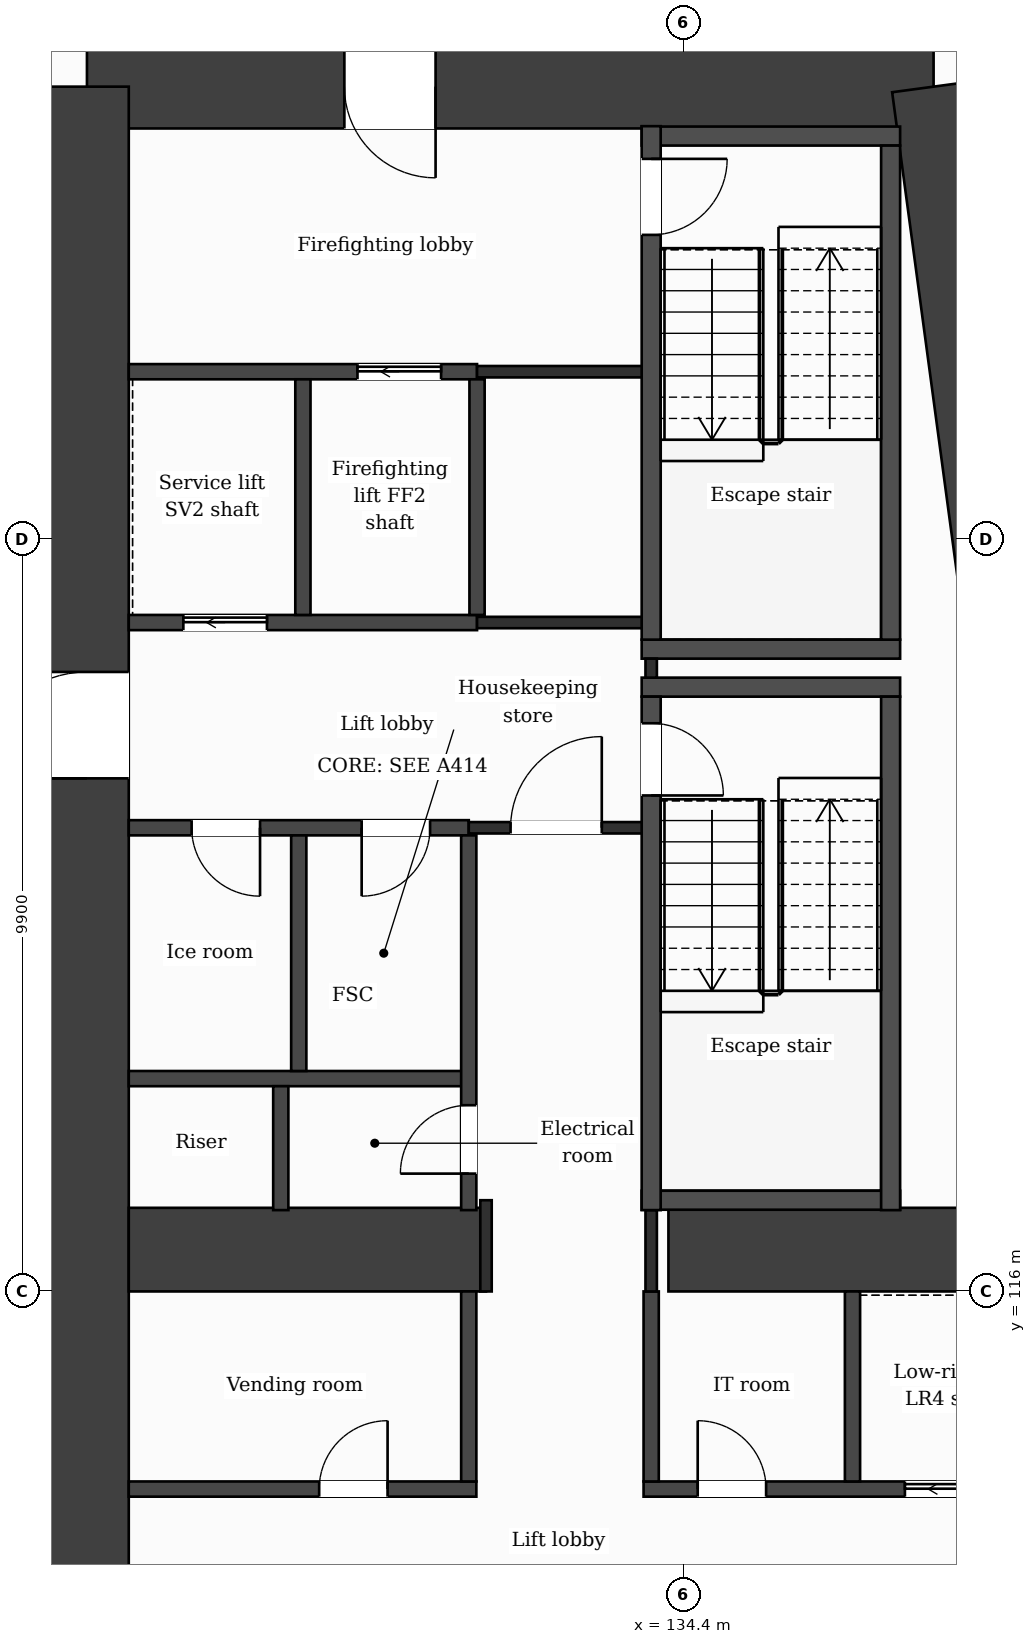
"""IFC4 building model, lengths in metres.
Left out: names, types, materials, properties, quantities, classifications, styles, units other than length and angle.
Written with IfcOpenShell. Run it as: python <this file> out.ifc"""

import sys

from ifc_helpers import new_model, si_unit, direction, frame, frame_2d, origin, place, context, subcontext, project, spatial, rectangle, extrude, element, fill, save


model = new_model("IFC4")
c1 = context("Model", 3, precision=1e-05, world=origin(), true_north=direction((0.0, 1.0)))
c2 = subcontext(c1, "Body", "Model", "MODEL_VIEW")
j1 = project(units=[si_unit("LENGTHUNIT", "METRE"), si_unit("PLANEANGLEUNIT", "RADIAN")], contexts=[c1])
p1 = place(None, origin())
s1 = spatial("IfcSite", under=j1, at=p1, CompositionType="ELEMENT")
p2 = place(p1, origin())
s2 = spatial("IfcBuilding", under=s1, at=p2, CompositionType="ELEMENT")
p3 = place(p2, frame((0.0, 0.0, 63.5)))
s3 = spatial("IfcBuildingStorey", under=s2, at=p3, CompositionType="ELEMENT", Elevation=63.5)
p4 = place(p3, frame((126.55, 131.85, 0.0), z_axis=(0.0, 0.0, 1.0), x_axis=(1.0, 0.0, 0.0)))
e1 = element("IfcWall", 1, at=p4, inside=s3, PredefinedType="SHEAR", context=c2, shape_type="SweptSolid", body=[
    extrude(rectangle(XDim=11.138, YDim=1.1, at=frame_2d((5.569, 0.0))), origin(), (0.0, 0.0, 1.0), 3.5),
])
p5 = place(p4, frame((3.386, 0.0, 0.0)))
e2 = element("IfcOpeningElement", 2, at=p5, cuts=e1, PredefinedType="OPENING", context=c2, shape_type="SweptSolid", body=[
    extrude(rectangle(XDim=1.2, YDim=2.1, at=frame_2d((0.6, 1.05))), frame((0.0, 0.56, 0.0), z_axis=(0.0, -1.0, 0.0), x_axis=(1.0, 0.0, 0.0)), (0.0, 0.0, 1.0), 1.12),
])
p6 = place(p3, frame((137.688, 131.85, 0.0), z_axis=(0.0, 0.0, 1.0), x_axis=(0.133411793472, -0.991060691059, 0.0)))
e3 = element("IfcWall", 3, at=p6, inside=s3, PredefinedType="SHEAR", context=c2, shape_type="SweptSolid", body=[
    extrude(rectangle(XDim=21.089, YDim=1.1, at=frame_2d((10.544, 0.0))), origin(), (0.0, 0.0, 1.0), 3.5),
])
p7 = place(p3, frame((126.55, 110.95, 0.0), z_axis=(0.0, 0.0, 1.0), x_axis=(0.0, 1.0, 0.0)))
e4 = element("IfcWall", 4, at=p7, inside=s3, PredefinedType="SHEAR", context=c2, shape_type="SweptSolid", body=[
    extrude(rectangle(XDim=20.9, YDim=1.1, at=frame_2d((10.45, 0.0))), origin(), (0.0, 0.0, 1.0), 3.5),
])
p8 = place(p7, frame((11.8, 0.0, 0.0)))
e5 = element("IfcOpeningElement", 5, at=p8, cuts=e4, PredefinedType="OPENING", context=c2, shape_type="SweptSolid", body=[
    extrude(rectangle(XDim=1.4, YDim=2.1, at=frame_2d((0.7, 1.05))), frame((0.0, 0.56, 0.0), z_axis=(0.0, -1.0, 0.0), x_axis=(1.0, 0.0, 0.0)), (0.0, 0.0, 1.0), 1.12),
])
p9 = place(p3, frame((127.1, 116.55, 0.0), z_axis=(0.0, 0.0, 1.0), x_axis=(1.0, 0.0, 0.0)))
e6 = element("IfcWall", 6, at=p9, inside=s3, PredefinedType="SHEAR", context=c2, shape_type="SweptSolid", body=[
    extrude(rectangle(XDim=4.7, YDim=1.1, at=frame_2d((2.35, 0.0))), origin(), (0.0, 0.0, 1.0), 3.5),
])
p10 = place(p3, frame((134.2, 116.55, 0.0), z_axis=(0.0, 0.0, 1.0), x_axis=(1.0, 0.0, 0.0)))
e7 = element("IfcWall", 7, at=p10, inside=s3, PredefinedType="SHEAR", context=c2, shape_type="SweptSolid", body=[
    extrude(rectangle(XDim=5.077, YDim=1.1, at=frame_2d((2.539, 0.0))), origin(), (0.0, 0.0, 1.0), 3.5),
])
p11 = place(p3, frame((127.1, 113.4, 0.0), z_axis=(0.0, 0.0, 1.0), x_axis=(1.0, 0.0, 0.0)))
e8 = element("IfcWall", 8, at=p11, inside=s3, PredefinedType="PARTITIONING", context=c2, shape_type="SweptSolid", body=[
    extrude(rectangle(XDim=4.573, YDim=0.2, at=frame_2d((2.287, 0.0))), origin(), (0.0, 0.0, 1.0), 3.18),
])
p12 = place(p11, frame((2.505, 0.0, 0.0)))
e9 = element("IfcOpeningElement", 9, at=p12, cuts=e8, PredefinedType="OPENING", context=c2, shape_type="SweptSolid", body=[
    extrude(rectangle(XDim=0.9, YDim=2.1, at=frame_2d((0.45, 1.05))), frame((0.0, 0.11, 0.0), z_axis=(0.0, -1.0, 0.0), x_axis=(1.0, 0.0, 0.0)), (0.0, 0.0, 1.0), 0.22),
])
p13 = place(p3, frame((133.873, 113.4, 0.0), z_axis=(0.0, 0.0, 1.0), x_axis=(1.0, 0.0, 0.0)))
e10 = element("IfcWall", 10, at=p13, inside=s3, PredefinedType="PARTITIONING", context=c2, shape_type="SweptSolid", body=[
    extrude(rectangle(XDim=5.774, YDim=0.2, at=frame_2d((2.887, 0.0))), origin(), (0.0, 0.0, 1.0), 3.18),
])
p14 = place(p13, frame((3.438, 0.0, 0.0)))
e11 = element("IfcOpeningElement", 11, at=p14, cuts=e10, PredefinedType="OPENING", context=c2, shape_type="SweptSolid", body=[
    extrude(rectangle(XDim=1.1, YDim=2.1, at=frame_2d((0.55, 1.05))), frame((0.0, 0.11, 0.0), z_axis=(0.0, -1.0, 0.0), x_axis=(1.0, 0.0, 0.0)), (0.0, 0.0, 1.0), 0.22),
])
p15 = place(p13, frame((0.712, 0.0, 0.0)))
e12 = element("IfcOpeningElement", 12, at=p15, cuts=e10, PredefinedType="OPENING", context=c2, shape_type="SweptSolid", body=[
    extrude(rectangle(XDim=0.9, YDim=2.1, at=frame_2d((0.45, 1.05))), frame((0.0, 0.11, 0.0), z_axis=(0.0, -1.0, 0.0), x_axis=(1.0, 0.0, 0.0)), (0.0, 0.0, 1.0), 0.22),
])
p16 = place(p3, frame((133.848, 117.2, 0.0), z_axis=(0.0, 0.0, 1.0), x_axis=(1.0, 0.0, 0.0)))
e13 = element("IfcWall", 13, at=p16, inside=s3, PredefinedType="PARTITIONING", context=c2, shape_type="SweptSolid", body=[
    extrude(rectangle(XDim=3.4, YDim=0.25, at=frame_2d((1.7, 0.0))), origin(), (0.0, 0.0, 1.0), 3.18),
])
p17 = place(p3, frame((127.1, 118.8, 0.0), z_axis=(0.0, 0.0, 1.0), x_axis=(1.0, 0.0, 0.0)))
e14 = element("IfcWall", 14, at=p17, inside=s3, PredefinedType="PARTITIONING", context=c2, shape_type="SweptSolid", body=[
    extrude(rectangle(XDim=4.473, YDim=0.2, at=frame_2d((2.236, 0.0))), origin(), (0.0, 0.0, 1.0), 3.18),
])
p18 = place(p3, frame((127.1, 122.1, 0.0), z_axis=(0.0, 0.0, 1.0), x_axis=(1.0, 0.0, 0.0)))
e15 = element("IfcWall", 15, at=p18, inside=s3, PredefinedType="PARTITIONING", context=c2, shape_type="SweptSolid", body=[
    extrude(rectangle(XDim=4.473, YDim=0.2, at=frame_2d((2.236, 0.0))), origin(), (0.0, 0.0, 1.0), 3.18),
])
p19 = place(p18, frame((3.064, 0.0, 0.0)))
e16 = element("IfcOpeningElement", 16, at=p19, cuts=e15, PredefinedType="OPENING", context=c2, shape_type="SweptSolid", body=[
    extrude(rectangle(XDim=0.9, YDim=2.1, at=frame_2d((0.45, 1.05))), frame((0.0, 0.11, 0.0), z_axis=(0.0, -1.0, 0.0), x_axis=(1.0, 0.0, 0.0)), (0.0, 0.0, 1.0), 0.22),
])
p20 = place(p18, frame((0.827, 0.0, 0.0)))
e17 = element("IfcOpeningElement", 17, at=p20, cuts=e15, PredefinedType="OPENING", context=c2, shape_type="SweptSolid", body=[
    extrude(rectangle(XDim=0.9, YDim=2.1, at=frame_2d((0.45, 1.05))), frame((0.0, 0.11, 0.0), z_axis=(0.0, -1.0, 0.0), x_axis=(1.0, 0.0, 0.0)), (0.0, 0.0, 1.0), 0.22),
])
p21 = place(p3, frame((131.573, 122.1, 0.0), z_axis=(0.0, 0.0, 1.0), x_axis=(1.0, 0.0, 0.0)))
e18 = element("IfcWall", 18, at=p21, inside=s3, PredefinedType="PARTITIONING", context=c2, shape_type="SweptSolid", body=[
    extrude(rectangle(XDim=2.4, YDim=0.15, at=frame_2d((1.2, 0.0))), origin(), (0.0, 0.0, 1.0), 3.18),
])
p22 = place(p21, frame((0.55, 0.0, 0.0)))
e19 = element("IfcOpeningElement", 19, at=p22, cuts=e18, PredefinedType="OPENING", context=c2, shape_type="SweptSolid", body=[
    extrude(rectangle(XDim=1.2, YDim=2.1, at=frame_2d((0.6, 1.05))), frame((0.0, 0.085, 0.0), z_axis=(0.0, -1.0, 0.0), x_axis=(1.0, 0.0, 0.0)), (0.0, 0.0, 1.0), 0.17),
])
for number, where, z_axis, x_axis in (
    (20, (133.848, 123.95, 0.0), (0.0, 0.0, 1.0), (1.0, 0.0, 0.0)),
    (21, (133.848, 124.45, 0.0), (0.0, 0.0, 1.0), (1.0, 0.0, 0.0)),
):
    element("IfcWall", number, at=place(p3, frame(where, z_axis=z_axis, x_axis=x_axis)), inside=s3, PredefinedType="PARTITIONING", context=c2, shape_type="SweptSolid", body=[
        extrude(rectangle(XDim=3.4, YDim=0.25, at=frame_2d((1.7, 0.0))), origin(), (0.0, 0.0, 1.0), 3.18),
    ])
p23 = place(p3, frame((127.1, 124.8, 0.0), z_axis=(0.0, 0.0, 1.0), x_axis=(1.0, 0.0, 0.0)))
e22 = element("IfcWall", 22, at=p23, inside=s3, PredefinedType="PARTITIONING", context=c2, shape_type="SweptSolid", body=[
    extrude(rectangle(XDim=4.582, YDim=0.2, at=frame_2d((2.291, 0.0))), origin(), (0.0, 0.0, 1.0), 3.18),
])
p24 = place(p23, frame((0.718, 0.0, 0.0)))
e23 = element("IfcOpeningElement", 23, at=p24, cuts=e22, PredefinedType="OPENING", context=c2, shape_type="SweptSolid", body=[
    extrude(rectangle(XDim=1.1, YDim=2.1, at=frame_2d((0.55, 1.05))), frame((0.0, 0.11, 0.0), z_axis=(0.0, -1.0, 0.0), x_axis=(1.0, 0.0, 0.0)), (0.0, 0.0, 1.0), 0.22),
])
p25 = place(p3, frame((131.682, 124.8, 0.0), z_axis=(0.0, 0.0, 1.0), x_axis=(1.0, 0.0, 0.0)))
e24 = element("IfcWall", 24, at=p25, inside=s3, PredefinedType="PARTITIONING", context=c2, shape_type="SweptSolid", body=[
    extrude(rectangle(XDim=2.416, YDim=0.15, at=frame_2d((1.208, 0.0))), origin(), (0.0, 0.0, 1.0), 3.18),
])
p26 = place(p3, frame((127.1, 128.1, 0.0), z_axis=(0.0, 0.0, 1.0), x_axis=(1.0, 0.0, 0.0)))
e25 = element("IfcWall", 25, at=p26, inside=s3, PredefinedType="PARTITIONING", context=c2, shape_type="SweptSolid", body=[
    extrude(rectangle(XDim=4.582, YDim=0.2, at=frame_2d((2.291, 0.0))), origin(), (0.0, 0.0, 1.0), 3.18),
])
p27 = place(p26, frame((3.009, 0.0, 0.0)))
e26 = element("IfcOpeningElement", 26, at=p27, cuts=e25, PredefinedType="OPENING", context=c2, shape_type="SweptSolid", body=[
    extrude(rectangle(XDim=1.1, YDim=2.1, at=frame_2d((0.55, 1.05))), frame((0.0, 0.11, 0.0), z_axis=(0.0, -1.0, 0.0), x_axis=(1.0, 0.0, 0.0)), (0.0, 0.0, 1.0), 0.22),
])
p28 = place(p3, frame((131.682, 128.1, 0.0), z_axis=(0.0, 0.0, 1.0), x_axis=(1.0, 0.0, 0.0)))
e27 = element("IfcWall", 27, at=p28, inside=s3, PredefinedType="PARTITIONING", context=c2, shape_type="SweptSolid", body=[
    extrude(rectangle(XDim=2.291, YDim=0.15, at=frame_2d((1.146, 0.0))), origin(), (0.0, 0.0, 1.0), 3.18),
])
p29 = place(p3, frame((133.848, 131.2, 0.0), z_axis=(0.0, 0.0, 1.0), x_axis=(1.0, 0.0, 0.0)))
e28 = element("IfcWall", 28, at=p29, inside=s3, PredefinedType="PARTITIONING", context=c2, shape_type="SweptSolid", body=[
    extrude(rectangle(XDim=3.4, YDim=0.25, at=frame_2d((1.7, 0.0))), origin(), (0.0, 0.0, 1.0), 3.18),
])
p30 = place(p3, frame((129.1, 117.07, 0.0), z_axis=(0.0, 0.0, 1.0), x_axis=(0.0, 1.0, 0.0)))
e29 = element("IfcWall", 29, at=p30, inside=s3, PredefinedType="PARTITIONING", context=c2, shape_type="SweptSolid", body=[
    extrude(rectangle(XDim=1.63, YDim=0.2, at=frame_2d((0.815, 0.0))), origin(), (0.0, 0.0, 1.0), 3.18),
])
for number, where, z_axis, x_axis in (
    (30, (129.336, 118.9, 0.0), (0.0, 0.0, 1.0), (0.0, 1.0, 0.0)),
    (31, (129.391, 124.9, 0.0), (0.0, 0.0, 1.0), (0.0, 1.0, 0.0)),
):
    element("IfcWall", number, at=place(p3, frame(where, z_axis=z_axis, x_axis=x_axis)), inside=s3, PredefinedType="PARTITIONING", context=c2, shape_type="SweptSolid", body=[
        extrude(rectangle(XDim=3.1, YDim=0.2, at=frame_2d((1.55, 0.0))), origin(), (0.0, 0.0, 1.0), 3.18),
    ])
p31 = place(p3, frame((131.573, 113.5, 0.0), z_axis=(0.0, 0.0, 1.0), x_axis=(0.0, 1.0, 0.0)))
e32 = element("IfcWall", 32, at=p31, inside=s3, PredefinedType="PARTITIONING", context=c2, shape_type="SweptSolid", body=[
    extrude(rectangle(XDim=2.5, YDim=0.2, at=frame_2d((1.25, 0.0))), origin(), (0.0, 0.0, 1.0), 3.18),
])
p32 = place(p3, frame((131.573, 117.07, 0.0), z_axis=(0.0, 0.0, 1.0), x_axis=(0.0, 1.0, 0.0)))
e33 = element("IfcWall", 33, at=p32, inside=s3, PredefinedType="PARTITIONING", context=c2, shape_type="SweptSolid", body=[
    extrude(rectangle(XDim=4.93, YDim=0.2, at=frame_2d((2.465, 0.0))), origin(), (0.0, 0.0, 1.0), 3.18),
])
p33 = place(p32, frame((0.48, 0.0, 0.0)))
e34 = element("IfcOpeningElement", 34, at=p33, cuts=e33, PredefinedType="OPENING", context=c2, shape_type="SweptSolid", body=[
    extrude(rectangle(XDim=0.9, YDim=2.1, at=frame_2d((0.45, 1.05))), frame((0.0, 0.11, 0.0), z_axis=(0.0, -1.0, 0.0), x_axis=(1.0, 0.0, 0.0)), (0.0, 0.0, 1.0), 0.22),
])
p34 = place(p3, frame((131.682, 124.9, 0.0), z_axis=(0.0, 0.0, 1.0), x_axis=(0.0, 1.0, 0.0)))
e35 = element("IfcWall", 35, at=p34, inside=s3, PredefinedType="PARTITIONING", context=c2, shape_type="SweptSolid", body=[
    extrude(rectangle(XDim=3.1, YDim=0.2, at=frame_2d((1.55, 0.0))), origin(), (0.0, 0.0, 1.0), 3.18),
])
p35 = place(p3, frame((131.8, 116.0, 0.0), z_axis=(0.0, 0.0, 1.0), x_axis=(0.0, 1.0, 0.0)))
e36 = element("IfcWall", 36, at=p35, inside=s3, PredefinedType="PARTITIONING", context=c2, shape_type="SweptSolid", body=[
    extrude(rectangle(XDim=1.2, YDim=0.15, at=frame_2d((0.6, 0.0))), origin(), (0.0, 0.0, 1.0), 3.18),
])
p36 = place(p3, frame((133.973, 113.5, 0.0), z_axis=(0.0, 0.0, 1.0), x_axis=(0.0, 1.0, 0.0)))
e37 = element("IfcWall", 37, at=p36, inside=s3, PredefinedType="PARTITIONING", context=c2, shape_type="SweptSolid", body=[
    extrude(rectangle(XDim=2.5, YDim=0.2, at=frame_2d((1.25, 0.0))), origin(), (0.0, 0.0, 1.0), 3.18),
])
p37 = place(p3, frame((133.973, 116.0, 0.0), z_axis=(0.0, 0.0, 1.0), x_axis=(0.0, 1.0, 0.0)))
e38 = element("IfcWall", 38, at=p37, inside=s3, PredefinedType="PARTITIONING", context=c2, shape_type="SweptSolid", body=[
    extrude(rectangle(XDim=1.07, YDim=0.15, at=frame_2d((0.535, 0.0))), origin(), (0.0, 0.0, 1.0), 3.18),
])
p38 = place(p3, frame((133.973, 124.075, 0.0), z_axis=(0.0, 0.0, 1.0), x_axis=(0.0, 1.0, 0.0)))
e39 = element("IfcWall", 39, at=p38, inside=s3, PredefinedType="PARTITIONING", context=c2, shape_type="SweptSolid", body=[
    extrude(rectangle(XDim=0.25, YDim=0.15, at=frame_2d((0.125, 0.0))), origin(), (0.0, 0.0, 1.0), 3.18),
])
p39 = place(p3, frame((133.973, 117.07, 0.0), z_axis=(0.0, 0.0, 1.0), x_axis=(0.0, 1.0, 0.0)))
e40 = element("IfcWall", 40, at=p39, inside=s3, PredefinedType="PARTITIONING", context=c2, shape_type="SweptSolid", body=[
    extrude(rectangle(XDim=6.755, YDim=0.25, at=frame_2d((3.377, 0.0))), origin(), (0.0, 0.0, 1.0), 3.18),
])
p40 = place(p39, frame((5.455, 0.0, 0.0)))
e41 = element("IfcOpeningElement", 41, at=p40, cuts=e40, PredefinedType="OPENING", context=c2, shape_type="SweptSolid", body=[
    extrude(rectangle(XDim=0.95, YDim=2.1, at=frame_2d((0.475, 1.05))), frame((0.0, 0.135, 0.0), z_axis=(0.0, -1.0, 0.0), x_axis=(1.0, 0.0, 0.0)), (0.0, 0.0, 1.0), 0.27),
])
p41 = place(p3, frame((133.973, 124.575, 0.0), z_axis=(0.0, 0.0, 1.0), x_axis=(0.0, 1.0, 0.0)))
e42 = element("IfcWall", 42, at=p41, inside=s3, PredefinedType="PARTITIONING", context=c2, shape_type="SweptSolid", body=[
    extrude(rectangle(XDim=6.755, YDim=0.25, at=frame_2d((3.377, 0.0))), origin(), (0.0, 0.0, 1.0), 3.18),
])
p42 = place(p41, frame((5.325, 0.0, 0.0)))
e43 = element("IfcOpeningElement", 43, at=p42, cuts=e42, PredefinedType="OPENING", context=c2, shape_type="SweptSolid", body=[
    extrude(rectangle(XDim=1.0, YDim=2.1, at=frame_2d((0.5, 1.05))), frame((0.0, 0.135, 0.0), z_axis=(0.0, -1.0, 0.0), x_axis=(1.0, 0.0, 0.0)), (0.0, 0.0, 1.0), 0.27),
])
p43 = place(p3, frame((136.622, 113.5, 0.0), z_axis=(0.0, 0.0, 1.0), x_axis=(0.0, 1.0, 0.0)))
e44 = element("IfcWall", 44, at=p43, inside=s3, PredefinedType="PARTITIONING", context=c2, shape_type="SweptSolid", body=[
    extrude(rectangle(XDim=2.5, YDim=0.2, at=frame_2d((1.25, 0.0))), origin(), (0.0, 0.0, 1.0), 3.18),
])
p44 = place(p3, frame((137.123, 117.07, 0.0), z_axis=(0.0, 0.0, 1.0), x_axis=(0.0, 1.0, 0.0)))
e45 = element("IfcWall", 45, at=p44, inside=s3, PredefinedType="PARTITIONING", context=c2, shape_type="SweptSolid", body=[
    extrude(rectangle(XDim=6.755, YDim=0.25, at=frame_2d((3.377, 0.0))), origin(), (0.0, 0.0, 1.0), 3.18),
])
p45 = place(p3, frame((137.123, 124.575, 0.0), z_axis=(0.0, 0.0, 1.0), x_axis=(0.0, 1.0, 0.0)))
e46 = element("IfcWall", 46, at=p45, inside=s3, PredefinedType="PARTITIONING", context=c2, shape_type="SweptSolid", body=[
    extrude(rectangle(XDim=6.5, YDim=0.25, at=frame_2d((3.25, 0.0))), origin(), (0.0, 0.0, 1.0), 3.18),
])
p46 = place(p22, origin())
e47 = element("IfcDoor", 47, at=p46, inside=s3, OperationType="SINGLE_SWING_RIGHT", PredefinedType="DOOR", context=c2, shape_type="SweptSolid", body=[
    extrude(rectangle(XDim=1.2, YDim=2.1, at=frame_2d((0.6, 1.05))), frame((0.0, 0.025, 0.0), z_axis=(0.0, -1.0, 0.0), x_axis=(1.0, 0.0, 0.0)), (0.0, 0.0, 1.0), 0.05),
])
fill(e19, e47)
p47 = place(p27, origin())
e48 = element("IfcDoor", 48, at=p47, inside=s3, OperationType="SLIDING_TO_LEFT", PredefinedType="DOOR", context=c2, shape_type="SweptSolid", body=[
    extrude(rectangle(XDim=1.1, YDim=2.1, at=frame_2d((0.55, 1.05))), frame((0.0, 0.025, 0.0), z_axis=(0.0, -1.0, 0.0), x_axis=(1.0, 0.0, 0.0)), (0.0, 0.0, 1.0), 0.05),
])
fill(e26, e48)
p48 = place(p24, origin())
e49 = element("IfcDoor", 49, at=p48, inside=s3, OperationType="SLIDING_TO_LEFT", PredefinedType="DOOR", context=c2, shape_type="SweptSolid", body=[
    extrude(rectangle(XDim=1.1, YDim=2.1, at=frame_2d((0.55, 1.05))), frame((0.0, 0.025, 0.0), z_axis=(0.0, -1.0, 0.0), x_axis=(1.0, 0.0, 0.0)), (0.0, 0.0, 1.0), 0.05),
])
fill(e23, e49)
p49 = place(p19, origin())
e50 = element("IfcDoor", 50, at=p49, inside=s3, OperationType="SINGLE_SWING_LEFT", PredefinedType="DOOR", context=c2, shape_type="SweptSolid", body=[
    extrude(rectangle(XDim=0.9, YDim=2.1, at=frame_2d((0.45, 1.05))), frame((0.0, 0.025, 0.0), z_axis=(0.0, -1.0, 0.0), x_axis=(1.0, 0.0, 0.0)), (0.0, 0.0, 1.0), 0.05),
])
fill(e16, e50)
p50 = place(p20, origin())
e51 = element("IfcDoor", 51, at=p50, inside=s3, OperationType="SINGLE_SWING_RIGHT", PredefinedType="DOOR", context=c2, shape_type="SweptSolid", body=[
    extrude(rectangle(XDim=0.9, YDim=2.1, at=frame_2d((0.45, 1.05))), frame((0.0, 0.025, 0.0), z_axis=(0.0, -1.0, 0.0), x_axis=(1.0, 0.0, 0.0)), (0.0, 0.0, 1.0), 0.05),
])
fill(e17, e51)
p51 = place(p40, origin())
e52 = element("IfcDoor", 52, at=p51, inside=s3, OperationType="SINGLE_SWING_LEFT", PredefinedType="DOOR", context=c2, shape_type="SweptSolid", body=[
    extrude(rectangle(XDim=0.95, YDim=2.1, at=frame_2d((0.475, 1.05))), frame((0.0, 0.025, 0.0), z_axis=(0.0, -1.0, 0.0), x_axis=(1.0, 0.0, 0.0)), (0.0, 0.0, 1.0), 0.05),
])
fill(e41, e52)
p52 = place(p42, origin())
e53 = element("IfcDoor", 53, at=p52, inside=s3, OperationType="SINGLE_SWING_RIGHT", PredefinedType="DOOR", context=c2, shape_type="SweptSolid", body=[
    extrude(rectangle(XDim=1.0, YDim=2.1, at=frame_2d((0.5, 1.05))), frame((0.0, 0.025, 0.0), z_axis=(0.0, -1.0, 0.0), x_axis=(1.0, 0.0, 0.0)), (0.0, 0.0, 1.0), 0.05),
])
fill(e43, e53)
p53 = place(p33, origin())
e54 = element("IfcDoor", 54, at=p53, inside=s3, OperationType="SINGLE_SWING_LEFT", PredefinedType="DOOR", context=c2, shape_type="SweptSolid", body=[
    extrude(rectangle(XDim=0.9, YDim=2.1, at=frame_2d((0.45, 1.05))), frame((0.0, 0.025, 0.0), z_axis=(0.0, -1.0, 0.0), x_axis=(1.0, 0.0, 0.0)), (0.0, 0.0, 1.0), 0.05),
])
fill(e34, e54)
p54 = place(p14, origin())
e55 = element("IfcDoor", 55, at=p54, inside=s3, OperationType="SLIDING_TO_LEFT", PredefinedType="DOOR", context=c2, shape_type="SweptSolid", body=[
    extrude(rectangle(XDim=1.1, YDim=2.1, at=frame_2d((0.55, 1.05))), frame((0.0, 0.025, 0.0), z_axis=(0.0, -1.0, 0.0), x_axis=(1.0, 0.0, 0.0)), (0.0, 0.0, 1.0), 0.05),
])
fill(e11, e55)
p55 = place(p15, origin())
e56 = element("IfcDoor", 56, at=p55, inside=s3, OperationType="SINGLE_SWING_LEFT", PredefinedType="DOOR", context=c2, shape_type="SweptSolid", body=[
    extrude(rectangle(XDim=0.9, YDim=2.1, at=frame_2d((0.45, 1.05))), frame((0.0, 0.025, 0.0), z_axis=(0.0, -1.0, 0.0), x_axis=(1.0, 0.0, 0.0)), (0.0, 0.0, 1.0), 0.05),
])
fill(e12, e56)
p56 = place(p12, origin())
e57 = element("IfcDoor", 57, at=p56, inside=s3, OperationType="SINGLE_SWING_RIGHT", PredefinedType="DOOR", context=c2, shape_type="SweptSolid", body=[
    extrude(rectangle(XDim=0.9, YDim=2.1, at=frame_2d((0.45, 1.05))), frame((0.0, 0.025, 0.0), z_axis=(0.0, -1.0, 0.0), x_axis=(1.0, 0.0, 0.0)), (0.0, 0.0, 1.0), 0.05),
])
fill(e9, e57)
p57 = place(p5, origin())
e58 = element("IfcDoor", 58, at=p57, inside=s3, OperationType="SINGLE_SWING_RIGHT", PredefinedType="DOOR", context=c2, shape_type="SweptSolid", body=[
    extrude(rectangle(XDim=1.2, YDim=2.1, at=frame_2d((0.6, 1.05))), frame((0.0, 0.025, 0.0), z_axis=(0.0, -1.0, 0.0), x_axis=(1.0, 0.0, 0.0)), (0.0, 0.0, 1.0), 0.05),
])
fill(e2, e58)
p58 = place(p8, origin())
e59 = element("IfcDoor", 59, at=p58, inside=s3, OperationType="SINGLE_SWING_LEFT", PredefinedType="DOOR", context=c2, shape_type="SweptSolid", body=[
    extrude(rectangle(XDim=1.4, YDim=2.1, at=frame_2d((0.7, 1.05))), frame((0.0, 0.025, 0.0), z_axis=(0.0, -1.0, 0.0), x_axis=(1.0, 0.0, 0.0)), (0.0, 0.0, 1.0), 0.05),
])
fill(e5, e59)
save(model, sys.argv[1])
